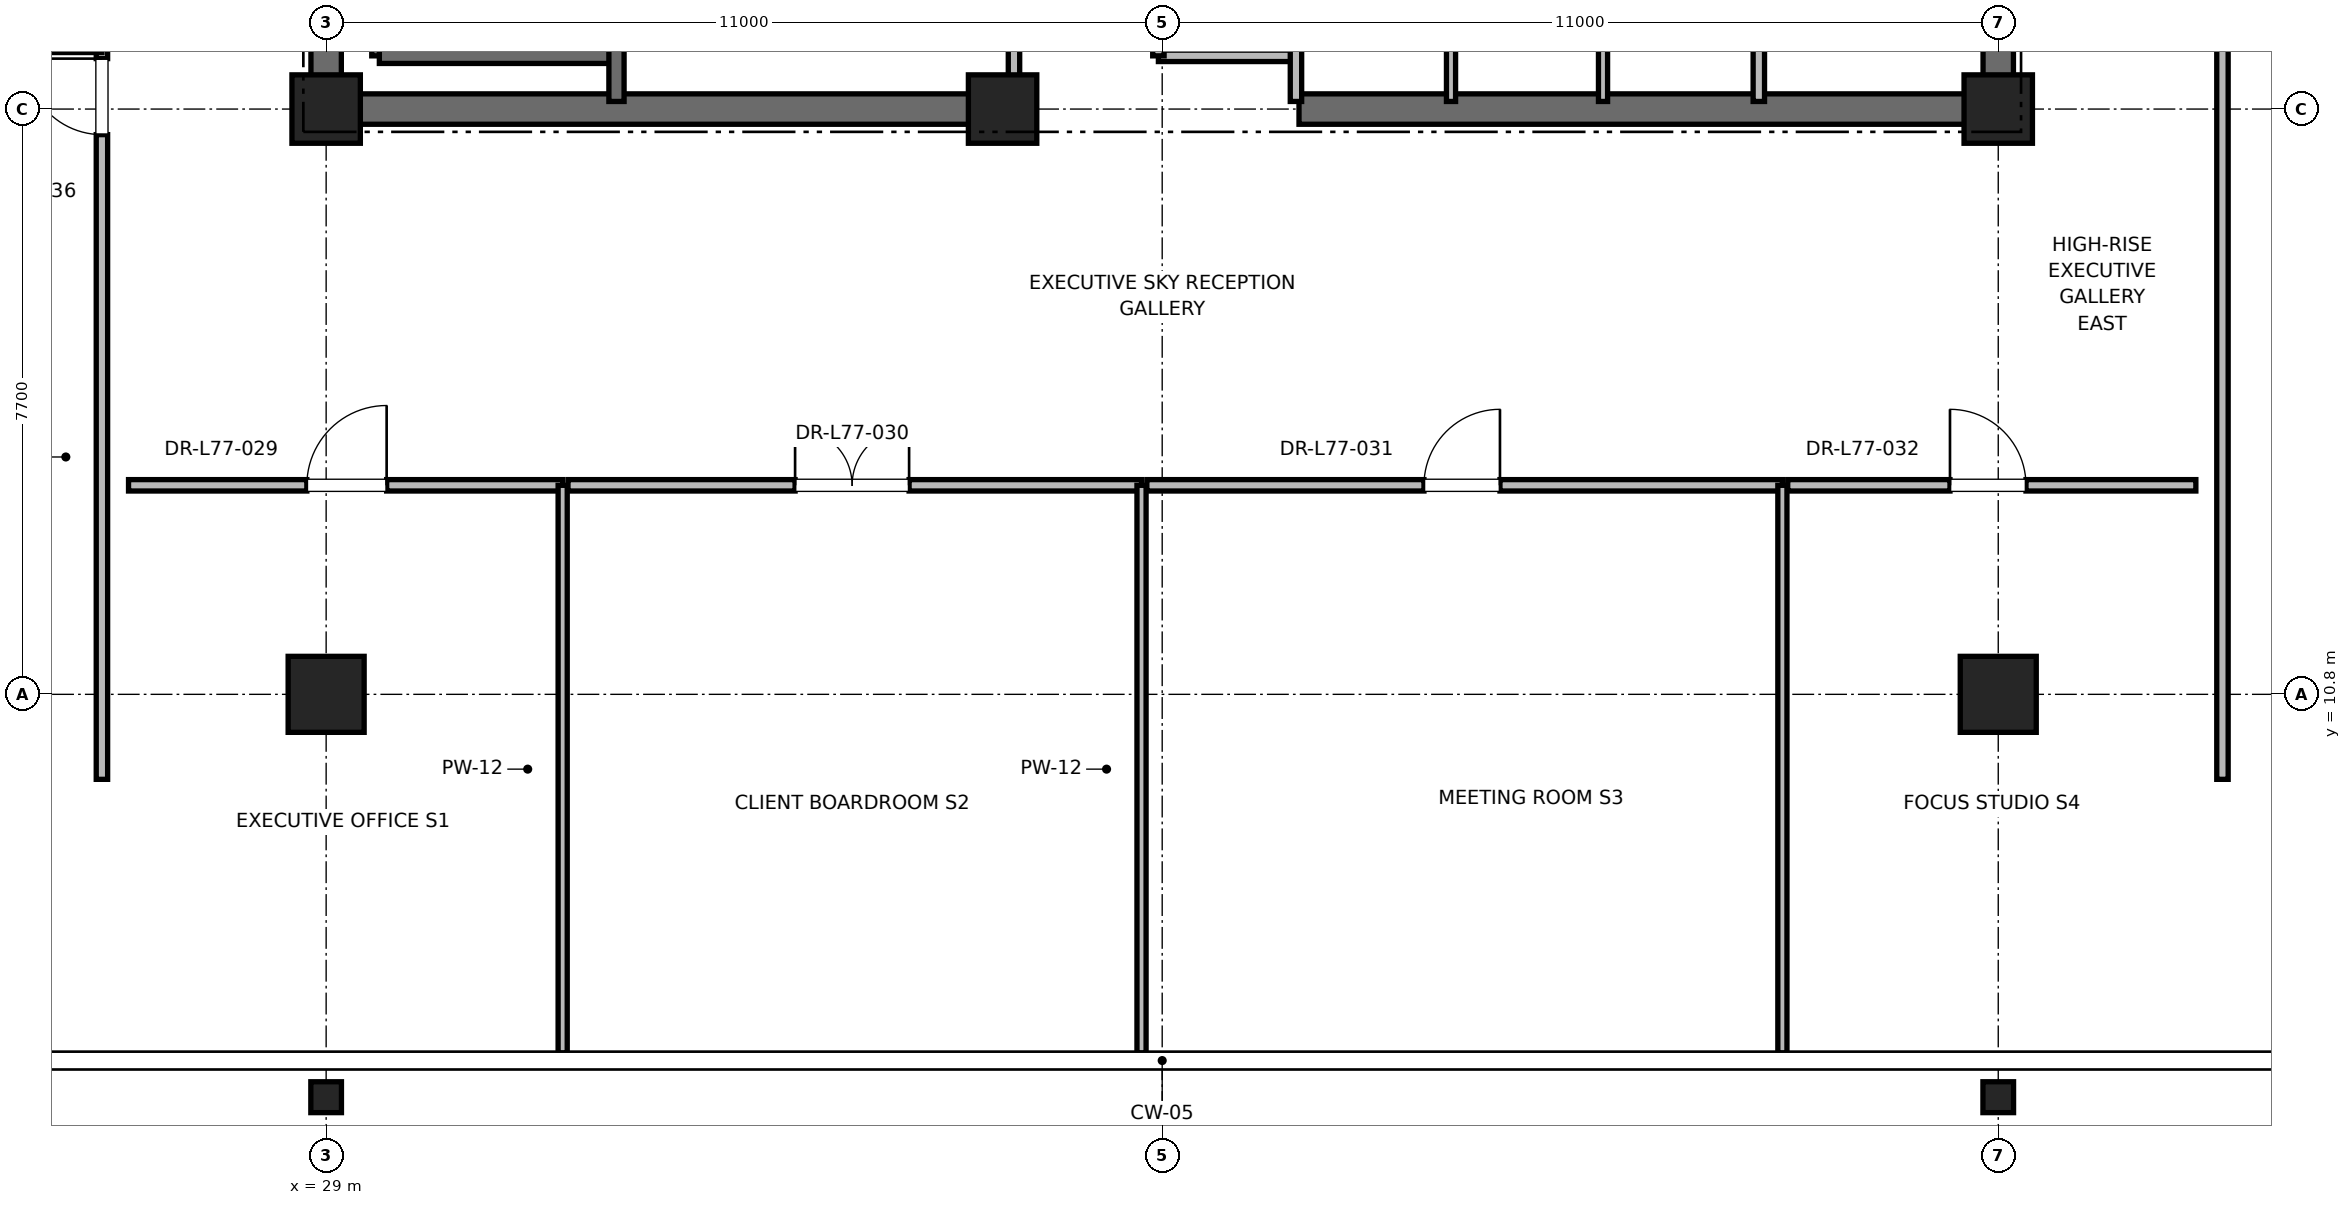
"""IFC4 building model, lengths in metres.
Left out: names, types, materials, properties, quantities, classifications, styles, units other than length and angle.
Written with IfcOpenShell. Run it as: python <this file> out.ifc"""

import sys

from ifc_helpers import new_model, si_unit, direction, frame, frame_2d, origin, origin_2d, place, context, subcontext, project, spatial, rectangle, i_section, extrude, element, fill, save


model = new_model("IFC4")
c1 = context("Model", 3, precision=1e-05, world=origin(), true_north=direction((0.0, 1.0)))
c2 = subcontext(c1, "Body", "Model", "MODEL_VIEW")
j1 = project(units=[si_unit("LENGTHUNIT", "METRE"), si_unit("PLANEANGLEUNIT", "RADIAN")], contexts=[c1])
p1 = place(None, origin())
s1 = spatial("IfcSite", under=j1, at=p1, CompositionType="ELEMENT")
p2 = place(p1, origin())
s2 = spatial("IfcBuilding", under=s1, at=p2, CompositionType="ELEMENT")
p3 = place(p2, frame((0.0, 0.0, 330.8)))
s3 = spatial("IfcBuildingStorey", under=s2, at=p3, CompositionType="ELEMENT", Elevation=330.8)
for number, where, z_axis, x_axis in (
    (1, (29.0, 10.8, 0.0), (0.0, 0.0, 1.0), (1.0, 0.0, 0.0)),
    (2, (51.0, 10.8, 0.0), (0.0, 0.0, 1.0), (1.0, 0.0, 0.0)),
):
    element("IfcColumn", number, at=place(p3, frame(where, z_axis=z_axis, x_axis=x_axis)), inside=s3, PredefinedType="COLUMN", context=c2, shape_type="SweptSolid", body=[
        extrude(rectangle(XDim=1.0, YDim=1.0, at=origin_2d()), origin(), (0.0, 0.0, 1.0), 4.0),
    ])
for number, where, z_axis, x_axis in (
    (3, (29.0, 5.5, 0.0), (0.0, 0.0, 1.0), (1.0, 0.0, 0.0)),
    (4, (51.0, 5.5, 0.0), (0.0, 0.0, 1.0), (1.0, 0.0, 0.0)),
):
    element("IfcColumn", number, at=place(p3, frame(where, z_axis=z_axis, x_axis=x_axis)), inside=s3, PredefinedType="COLUMN", context=c2, shape_type="SweptSolid", body=[
        extrude(i_section(OverallWidth=0.403, OverallDepth=0.406, WebThickness=0.027, FlangeThickness=0.043, FilletRadius=0.015, at=origin_2d()), origin(), (0.0, 0.0, 1.0), 4.0),
    ])
for number, where, z_axis, x_axis in (
    (5, (29.0, 18.5, 0.0), (0.0, 0.0, 1.0), (1.0, 0.0, 0.0)),
    (6, (51.0, 18.5, 0.0), (0.0, 0.0, 1.0), (1.0, 0.0, 0.0)),
    (7, (37.9, 18.5, 0.0), (0.0, 0.0, 1.0), (1.0, 0.0, 0.0)),
):
    element("IfcColumn", number, at=place(p3, frame(where, z_axis=z_axis, x_axis=x_axis)), inside=s3, PredefinedType="PILASTER", context=c2, shape_type="SweptSolid", body=[
        extrude(rectangle(XDim=0.9, YDim=0.9, at=origin_2d()), origin(), (0.0, 0.0, 1.0), 4.0),
    ])
for number, where, z_axis, x_axis in (
    (8, (29.0, 18.5, 0.0), (0.0, 0.0, 1.0), (1.0, 0.0, 0.0)),
    (9, (41.8, 18.5, 0.0), (0.0, 0.0, 1.0), (1.0, 0.0, 0.0)),
):
    element("IfcWall", number, at=place(p3, frame(where, z_axis=z_axis, x_axis=x_axis)), inside=s3, PredefinedType="SHEAR", context=c2, shape_type="SweptSolid", body=[
        extrude(rectangle(XDim=9.2, YDim=0.4, at=frame_2d((4.6, 0.0))), origin(), (0.0, 0.0, 1.0), 3.785),
    ])
p4 = place(p3, frame((29.0, 18.5, 0.0), z_axis=(0.0, 0.0, 1.0), x_axis=(0.0, 1.0, 0.0)))
e10 = element("IfcWall", 10, at=p4, inside=s3, PredefinedType="SHEAR", context=c2, shape_type="SweptSolid", body=[
    extrude(rectangle(XDim=8.8, YDim=0.4, at=frame_2d((4.4, 0.0))), origin(), (0.0, 0.0, 1.0), 3.785),
])
p5 = place(p3, frame((51.0, 18.5, 0.0), z_axis=(0.0, 0.0, 1.0), x_axis=(0.0, 1.0, 0.0)))
e11 = element("IfcWall", 11, at=p5, inside=s3, PredefinedType="SHEAR", context=c2, shape_type="SweptSolid", body=[
    extrude(rectangle(XDim=5.8, YDim=0.4, at=frame_2d((2.9, 0.0))), origin(), (0.0, 0.0, 1.0), 3.785),
])
p6 = place(p3, frame((29.7, 19.2, 0.0), z_axis=(0.0, 0.0, 1.0), x_axis=(0.0, 1.0, 0.0)))
e12 = element("IfcWall", 12, at=p6, inside=s3, PredefinedType="SOLIDWALL", context=c2, shape_type="SweptSolid", body=[
    extrude(rectangle(XDim=8.15, YDim=0.2, at=frame_2d((4.075, 0.0))), origin(), (0.0, 0.0, 1.0), 3.785),
])
p7 = place(p3, frame((29.7, 19.2, 0.0), z_axis=(0.0, 0.0, 1.0), x_axis=(1.0, 0.0, 0.0)))
e13 = element("IfcWall", 13, at=p7, inside=s3, PredefinedType="SOLIDWALL", context=c2, shape_type="SweptSolid", body=[
    extrude(rectangle(XDim=3.12, YDim=0.2, at=frame_2d((1.56, 0.0))), origin(), (0.0, 0.0, 1.0), 3.785),
])
p8 = place(p3, frame((32.82, 18.6, 0.0), z_axis=(0.0, 0.0, 1.0), x_axis=(0.0, 1.0, 0.0)))
e14 = element("IfcWall", 14, at=p8, inside=s3, PredefinedType="SOLIDWALL", context=c2, shape_type="SweptSolid", body=[
    extrude(rectangle(XDim=8.78, YDim=0.2, at=frame_2d((4.39, 0.0))), origin(), (0.0, 0.0, 1.0), 3.785),
])
p9 = place(p3, frame((39.95, 19.2, 0.0), z_axis=(0.0, 0.0, 1.0), x_axis=(1.0, 0.0, 0.0)))
e15 = element("IfcWall", 15, at=p9, inside=s3, PredefinedType="PARTITIONING", context=c2, shape_type="SweptSolid", body=[
    extrude(rectangle(XDim=1.81, YDim=0.15, at=frame_2d((0.905, 0.0))), origin(), (0.0, 0.0, 1.0), 2.85),
])
p10 = place(p3, frame((41.76, 18.6, 0.0), z_axis=(0.0, 0.0, 1.0), x_axis=(0.0, 1.0, 0.0)))
e16 = element("IfcWall", 16, at=p10, inside=s3, PredefinedType="PARTITIONING", context=c2, shape_type="SweptSolid", body=[
    extrude(rectangle(XDim=3.6, YDim=0.15, at=frame_2d((1.8, 0.0))), origin(), (0.0, 0.0, 1.0), 2.85),
])
p11 = place(p3, frame((39.95, 19.2, 0.0), z_axis=(0.0, 0.0, 1.0), x_axis=(0.0, 1.0, 0.0)))
e17 = element("IfcWall", 17, at=p11, inside=s3, PredefinedType="PARTITIONING", context=c2, shape_type="SweptSolid", body=[
    extrude(rectangle(XDim=3.0, YDim=0.15, at=frame_2d((1.5, 0.0))), origin(), (0.0, 0.0, 1.0), 2.85),
])
p12 = place(p11, frame((1.05, 0.0, 0.0)))
e18 = element("IfcOpeningElement", 18, at=p12, cuts=e17, PredefinedType="OPENING", context=c2, shape_type="SweptSolid", body=[
    extrude(rectangle(XDim=0.9, YDim=2.1, at=frame_2d((0.45, 1.05))), frame((0.0, 0.075, 0.0), z_axis=(0.0, -1.0, 0.0), x_axis=(1.0, 0.0, 0.0)), (0.0, 0.0, 1.0), 0.15),
])
p13 = place(p3, frame((38.05, 18.6, 0.0), z_axis=(0.0, 0.0, 1.0), x_axis=(0.0, 1.0, 0.0)))
e19 = element("IfcWall", 19, at=p13, inside=s3, PredefinedType="PARTITIONING", context=c2, shape_type="SweptSolid", body=[
    extrude(rectangle(XDim=3.06, YDim=0.15, at=frame_2d((1.53, 0.0))), origin(), (0.0, 0.0, 1.0), 2.85),
])
p14 = place(p13, frame((1.03, 0.0, 0.0)))
e20 = element("IfcOpeningElement", 20, at=p14, cuts=e19, PredefinedType="OPENING", context=c2, shape_type="SweptSolid", body=[
    extrude(rectangle(XDim=1.0, YDim=2.15, at=frame_2d((0.5, 1.075))), frame((0.0, 0.075, 0.0), z_axis=(0.0, -1.0, 0.0), x_axis=(1.0, 0.0, 0.0)), (0.0, 0.0, 1.0), 0.15),
])
p15 = place(p3, frame((47.85, 18.6, 0.0), z_axis=(0.0, 0.0, 1.0), x_axis=(0.0, 1.0, 0.0)))
e21 = element("IfcWall", 21, at=p15, inside=s3, PredefinedType="PARTITIONING", context=c2, shape_type="SweptSolid", body=[
    extrude(rectangle(XDim=2.54, YDim=0.15, at=frame_2d((1.27, 0.0))), origin(), (0.0, 0.0, 1.0), 2.85),
])
for number, where, z_axis, x_axis in (
    (22, (43.8, 18.6, 0.0), (0.0, 0.0, 1.0), (0.0, 1.0, 0.0)),
    (23, (45.8, 18.6, 0.0), (0.0, 0.0, 1.0), (0.0, 1.0, 0.0)),
):
    element("IfcWall", number, at=place(p3, frame(where, z_axis=z_axis, x_axis=x_axis)), inside=s3, PredefinedType="PARTITIONING", context=c2, shape_type="SweptSolid", body=[
        extrude(rectangle(XDim=3.02, YDim=0.12, at=frame_2d((1.51, 0.0))), origin(), (0.0, 0.0, 1.0), 2.85),
    ])
p16 = place(p3, frame((26.4, 13.55, 0.0), z_axis=(0.0, 0.0, 1.0), x_axis=(1.0, 0.0, 0.0)))
e24 = element("IfcWall", 24, at=p16, inside=s3, PredefinedType="PARTITIONING", context=c2, shape_type="SweptSolid", body=[
    extrude(rectangle(XDim=5.712, YDim=0.15, at=frame_2d((2.856, 0.0))), origin(), (0.0, 0.0, 1.0), 2.85),
])
p17 = place(p16, frame((2.346, 0.0, 0.0)))
e25 = element("IfcOpeningElement", 25, at=p17, cuts=e24, PredefinedType="OPENING", context=c2, shape_type="SweptSolid", body=[
    extrude(rectangle(XDim=1.05, YDim=2.2, at=frame_2d((0.525, 1.1))), frame((0.0, 0.075, 0.0), z_axis=(0.0, -1.0, 0.0), x_axis=(1.0, 0.0, 0.0)), (0.0, 0.0, 1.0), 0.15),
])
p18 = place(p3, frame((32.112, 6.082, 0.0), z_axis=(0.0, 0.0, 1.0), x_axis=(0.0, 1.0, 0.0)))
e26 = element("IfcWall", 26, at=p18, inside=s3, PredefinedType="PARTITIONING", context=c2, shape_type="SweptSolid", body=[
    extrude(rectangle(XDim=7.468, YDim=0.12, at=frame_2d((3.734, 0.0))), origin(), (0.0, 0.0, 1.0), 2.415),
])
p19 = place(p3, frame((32.182, 13.55, 0.0), z_axis=(0.0, 0.0, 1.0), x_axis=(1.0, 0.0, 0.0)))
e27 = element("IfcWall", 27, at=p19, inside=s3, PredefinedType="PARTITIONING", context=c2, shape_type="SweptSolid", body=[
    extrude(rectangle(XDim=7.546, YDim=0.15, at=frame_2d((3.773, 0.0))), origin(), (0.0, 0.0, 1.0), 2.85),
])
p20 = place(p19, frame((2.988, 0.0, 0.0)))
e28 = element("IfcOpeningElement", 28, at=p20, cuts=e27, PredefinedType="OPENING", context=c2, shape_type="SweptSolid", body=[
    extrude(rectangle(XDim=1.5, YDim=2.25, at=frame_2d((0.75, 1.125))), frame((0.0, 0.075, 0.0), z_axis=(0.0, -1.0, 0.0), x_axis=(1.0, 0.0, 0.0)), (0.0, 0.0, 1.0), 0.15),
])
p21 = place(p3, frame((39.728, 6.082, 0.0), z_axis=(0.0, 0.0, 1.0), x_axis=(0.0, 1.0, 0.0)))
e29 = element("IfcWall", 29, at=p21, inside=s3, PredefinedType="PARTITIONING", context=c2, shape_type="SweptSolid", body=[
    extrude(rectangle(XDim=7.468, YDim=0.12, at=frame_2d((3.734, 0.0))), origin(), (0.0, 0.0, 1.0), 2.415),
])
p22 = place(p3, frame((39.798, 13.55, 0.0), z_axis=(0.0, 0.0, 1.0), x_axis=(1.0, 0.0, 0.0)))
e30 = element("IfcWall", 30, at=p22, inside=s3, PredefinedType="PARTITIONING", context=c2, shape_type="SweptSolid", body=[
    extrude(rectangle(XDim=8.362, YDim=0.15, at=frame_2d((4.181, 0.0))), origin(), (0.0, 0.0, 1.0), 2.85),
])
p23 = place(p22, frame((3.646, 0.0, 0.0)))
e31 = element("IfcOpeningElement", 31, at=p23, cuts=e30, PredefinedType="OPENING", context=c2, shape_type="SweptSolid", body=[
    extrude(rectangle(XDim=1.0, YDim=2.15, at=frame_2d((0.5, 1.075))), frame((0.0, 0.075, 0.0), z_axis=(0.0, -1.0, 0.0), x_axis=(1.0, 0.0, 0.0)), (0.0, 0.0, 1.0), 0.15),
])
p24 = place(p3, frame((48.16, 6.082, 0.0), z_axis=(0.0, 0.0, 1.0), x_axis=(0.0, 1.0, 0.0)))
e32 = element("IfcWall", 32, at=p24, inside=s3, PredefinedType="PARTITIONING", context=c2, shape_type="SweptSolid", body=[
    extrude(rectangle(XDim=7.468, YDim=0.12, at=frame_2d((3.734, 0.0))), origin(), (0.0, 0.0, 1.0), 2.415),
])
p25 = place(p3, frame((48.23, 13.55, 0.0), z_axis=(0.0, 0.0, 1.0), x_axis=(1.0, 0.0, 0.0)))
e33 = element("IfcWall", 33, at=p25, inside=s3, PredefinedType="PARTITIONING", context=c2, shape_type="SweptSolid", body=[
    extrude(rectangle(XDim=5.37, YDim=0.15, at=frame_2d((2.685, 0.0))), origin(), (0.0, 0.0, 1.0), 2.85),
])
p26 = place(p25, frame((2.135, 0.0, 0.0)))
e34 = element("IfcOpeningElement", 34, at=p26, cuts=e33, PredefinedType="OPENING", context=c2, shape_type="SweptSolid", body=[
    extrude(rectangle(XDim=1.0, YDim=2.15, at=frame_2d((0.5, 1.075))), frame((0.0, 0.075, 0.0), z_axis=(0.0, -1.0, 0.0), x_axis=(1.0, 0.0, 0.0)), (0.0, 0.0, 1.0), 0.15),
])
p27 = place(p3, frame((26.05, 9.682, 0.0), z_axis=(0.0, 0.0, 1.0), x_axis=(0.0, 1.0, 0.0)))
e35 = element("IfcWall", 35, at=p27, inside=s3, PredefinedType="PARTITIONING", context=c2, shape_type="SweptSolid", body=[
    extrude(rectangle(XDim=9.622, YDim=0.15, at=frame_2d((4.811, 0.0))), origin(), (0.0, 0.0, 1.0), 2.85),
])
p28 = place(p27, frame((8.482, 0.0, 0.0)))
e36 = element("IfcOpeningElement", 36, at=p28, cuts=e35, PredefinedType="OPENING", context=c2, shape_type="SweptSolid", body=[
    extrude(rectangle(XDim=1.0, YDim=2.15, at=frame_2d((0.5, 1.075))), frame((0.0, 0.075, 0.0), z_axis=(0.0, -1.0, 0.0), x_axis=(1.0, 0.0, 0.0)), (0.0, 0.0, 1.0), 0.15),
])
p29 = place(p3, frame((15.464, 19.304, 0.0), z_axis=(0.0, 0.0, 1.0), x_axis=(1.0, 0.0, 0.0)))
e37 = element("IfcWall", 37, at=p29, inside=s3, PredefinedType="PARTITIONING", context=c2, shape_type="SweptSolid", body=[
    extrude(rectangle(XDim=10.586, YDim=0.12, at=frame_2d((5.293, 0.0))), origin(), (0.0, 0.0, 1.0), 2.85),
])
p30 = place(p3, frame((53.95, 9.682, 0.0), z_axis=(0.0, 0.0, 1.0), x_axis=(0.0, 1.0, 0.0)))
e38 = element("IfcWall", 38, at=p30, inside=s3, PredefinedType="PARTITIONING", context=c2, shape_type="SweptSolid", body=[
    extrude(rectangle(XDim=13.542, YDim=0.15, at=frame_2d((6.771, 0.0))), origin(), (0.0, 0.0, 1.0), 2.85),
])
p31 = place(p30, frame((10.695, 0.0, 0.0)))
e39 = element("IfcOpeningElement", 39, at=p31, cuts=e38, PredefinedType="OPENING", context=c2, shape_type="SweptSolid", body=[
    extrude(rectangle(XDim=1.0, YDim=2.15, at=frame_2d((0.5, 1.075))), frame((0.0, 0.075, 0.0), z_axis=(0.0, -1.0, 0.0), x_axis=(1.0, 0.0, 0.0)), (0.0, 0.0, 1.0), 0.15),
])
p32 = place(p17, origin())
e40 = element("IfcDoor", 40, at=p32, inside=s3, OperationType="SINGLE_SWING_RIGHT", PredefinedType="DOOR", context=c2, shape_type="SweptSolid", body=[
    extrude(rectangle(XDim=1.05, YDim=2.2, at=frame_2d((0.525, 1.1))), frame((0.0, 0.025, 0.0), z_axis=(0.0, -1.0, 0.0), x_axis=(1.0, 0.0, 0.0)), (0.0, 0.0, 1.0), 0.05),
])
fill(e25, e40)
p33 = place(p20, origin())
e41 = element("IfcDoor", 41, at=p33, inside=s3, OperationType="DOUBLE_DOOR_SINGLE_SWING", PredefinedType="DOOR", context=c2, shape_type="SweptSolid", body=[
    extrude(rectangle(XDim=1.5, YDim=2.25, at=frame_2d((0.75, 1.125))), frame((0.0, 0.025, 0.0), z_axis=(0.0, -1.0, 0.0), x_axis=(1.0, 0.0, 0.0)), (0.0, 0.0, 1.0), 0.05),
])
fill(e28, e41)
p34 = place(p23, origin())
e42 = element("IfcDoor", 42, at=p34, inside=s3, OperationType="SINGLE_SWING_RIGHT", PredefinedType="DOOR", context=c2, shape_type="SweptSolid", body=[
    extrude(rectangle(XDim=1.0, YDim=2.15, at=frame_2d((0.5, 1.075))), frame((0.0, 0.025, 0.0), z_axis=(0.0, -1.0, 0.0), x_axis=(1.0, 0.0, 0.0)), (0.0, 0.0, 1.0), 0.05),
])
fill(e31, e42)
p35 = place(p26, origin())
e43 = element("IfcDoor", 43, at=p35, inside=s3, OperationType="SINGLE_SWING_LEFT", PredefinedType="DOOR", context=c2, shape_type="SweptSolid", body=[
    extrude(rectangle(XDim=1.0, YDim=2.15, at=frame_2d((0.5, 1.075))), frame((0.0, 0.025, 0.0), z_axis=(0.0, -1.0, 0.0), x_axis=(1.0, 0.0, 0.0)), (0.0, 0.0, 1.0), 0.05),
])
fill(e34, e43)
p36 = place(p28, origin())
e44 = element("IfcDoor", 44, at=p36, inside=s3, OperationType="SINGLE_SWING_RIGHT", PredefinedType="DOOR", context=c2, shape_type="SweptSolid", body=[
    extrude(rectangle(XDim=1.0, YDim=2.15, at=frame_2d((0.5, 1.075))), frame((0.0, 0.025, 0.0), z_axis=(0.0, -1.0, 0.0), x_axis=(1.0, 0.0, 0.0)), (0.0, 0.0, 1.0), 0.05),
])
fill(e36, e44)
save(model, sys.argv[1])
